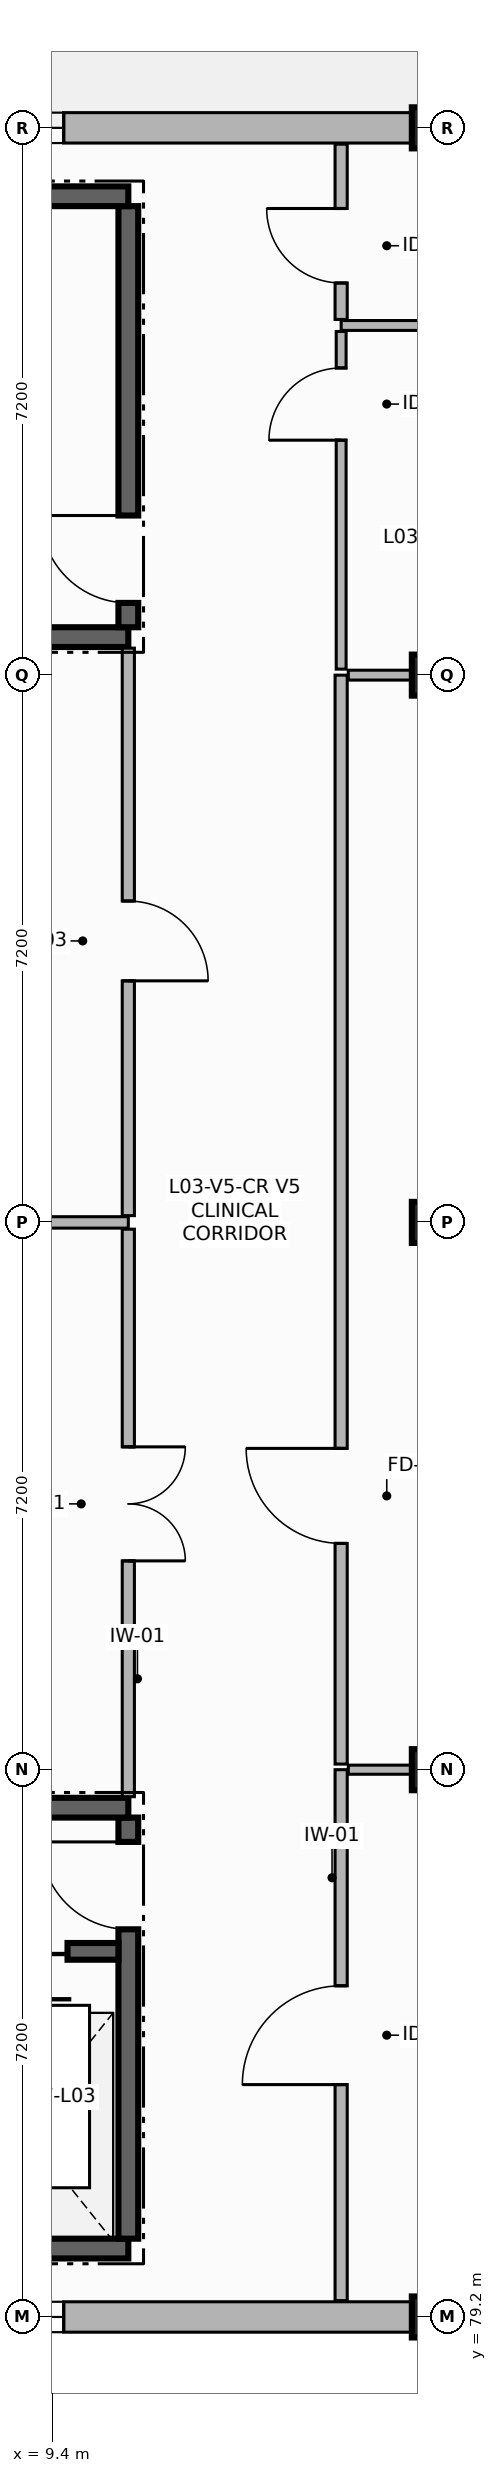
"""IFC4 building model, lengths in metres.
Left out: names, types, materials, properties, quantities, classifications, styles, units other than length and angle.
Written with IfcOpenShell. Run it as: python <this file> out.ifc"""

import sys

from ifc_helpers import new_model, si_unit, direction, frame, frame_2d, origin, origin_2d, place, context, subcontext, project, spatial, rectangle, extrude, element, fill, save


model = new_model("IFC4")
c1 = context("Model", 3, precision=1e-05, world=origin(), true_north=direction((0.0, 1.0)))
c2 = subcontext(c1, "Body", "Model", "MODEL_VIEW")
j1 = project(units=[si_unit("LENGTHUNIT", "METRE"), si_unit("PLANEANGLEUNIT", "RADIAN")], contexts=[c1])
p1 = place(None, origin())
s1 = spatial("IfcSite", under=j1, at=p1, CompositionType="ELEMENT")
p2 = place(p1, origin())
s2 = spatial("IfcBuilding", under=s1, at=p2, CompositionType="ELEMENT")
p3 = place(p2, frame((0.0, 0.0, 12.3)))
s3 = spatial("IfcBuildingStorey", under=s2, at=p3, CompositionType="ELEMENT", Elevation=12.3)
for number, where, z_axis, x_axis in (
    (1, (14.4, 79.2, 0.0), (0.0, 0.0, 1.0), (1.0, 0.0, 0.0)),
    (2, (14.4, 86.4, 0.0), (0.0, 0.0, 1.0), (1.0, 0.0, 0.0)),
    (3, (14.4, 93.6, 0.0), (0.0, 0.0, 1.0), (1.0, 0.0, 0.0)),
    (4, (14.4, 100.8, 0.0), (0.0, 0.0, 1.0), (1.0, 0.0, 0.0)),
    (5, (14.4, 108.0, 0.0), (0.0, 0.0, 1.0), (1.0, 0.0, 0.0)),
):
    element("IfcColumn", number, at=place(p3, frame(where, z_axis=z_axis, x_axis=x_axis)), inside=s3, PredefinedType="COLUMN", context=c2, shape_type="SweptSolid", body=[
        extrude(rectangle(XDim=0.54, YDim=0.54, at=origin_2d()), origin(), (0.0, 0.0, 1.0), 3.39),
    ])
p4 = place(p3, frame((7.2, 79.2, 0.0), z_axis=(0.0, 0.0, 1.0), x_axis=(1.0, 0.0, 0.0)))
e6 = element("IfcWall", 6, at=p4, inside=s3, PredefinedType="SOLIDWALL", context=c2, shape_type="SweptSolid", body=[
    extrude(rectangle(XDim=7.2, YDim=0.4, at=frame_2d((3.6, 0.0))), origin(), (0.0, 0.0, 1.0), 2.72),
])
p5 = place(p4, frame((0.85, 0.0, 0.9)))
e7 = element("IfcOpeningElement", 7, at=p5, cuts=e6, PredefinedType="OPENING", context=c2, shape_type="SweptSolid", body=[
    extrude(rectangle(XDim=1.5, YDim=1.6, at=frame_2d((0.75, 0.8))), frame((0.0, 0.21, 0.0), z_axis=(0.0, -1.0, 0.0), x_axis=(1.0, 0.0, 0.0)), (0.0, 0.0, 1.0), 0.42),
])
p6 = place(p3, frame((14.4, 108.0, 0.0), z_axis=(0.0, 0.0, 1.0), x_axis=(-1.0, 0.0, 0.0)))
e8 = element("IfcWall", 8, at=p6, inside=s3, PredefinedType="SOLIDWALL", context=c2, shape_type="SweptSolid", body=[
    extrude(rectangle(XDim=7.2, YDim=0.4, at=frame_2d((3.6, 0.0))), origin(), (0.0, 0.0, 1.0), 2.72),
])
p7 = place(p6, frame((4.85, 0.0, 0.9)))
e9 = element("IfcOpeningElement", 9, at=p7, cuts=e8, PredefinedType="OPENING", context=c2, shape_type="SweptSolid", body=[
    extrude(rectangle(XDim=1.5, YDim=1.6, at=frame_2d((0.75, 0.8))), frame((0.0, 0.21, 0.0), z_axis=(0.0, -1.0, 0.0), x_axis=(1.0, 0.0, 0.0)), (0.0, 0.0, 1.0), 0.42),
])
p8 = place(p3, frame((0.9, 80.1, 0.0), z_axis=(0.0, 0.0, 1.0), x_axis=(1.0, 0.0, 0.0)))
e10 = element("IfcWall", 10, at=p8, inside=s3, PredefinedType="SHEAR", context=c2, shape_type="SweptSolid", body=[
    extrude(rectangle(XDim=9.5, YDim=0.26, at=frame_2d((4.75, 0.0))), origin(), (0.0, 0.0, 1.0), 3.39),
])
p9 = place(p3, frame((10.4, 80.23, 0.0), z_axis=(0.0, 0.0, 1.0), x_axis=(0.0, 1.0, 0.0)))
e11 = element("IfcWall", 11, at=p9, inside=s3, PredefinedType="SHEAR", context=c2, shape_type="SweptSolid", body=[
    extrude(rectangle(XDim=5.54, YDim=0.26, at=frame_2d((2.77, 0.0))), origin(), (0.0, 0.0, 1.0), 3.39),
])
p10 = place(p9, frame((4.07, 0.0, 0.0)))
e12 = element("IfcOpeningElement", 12, at=p10, cuts=e11, PredefinedType="OPENING", context=c2, shape_type="SweptSolid", body=[
    extrude(rectangle(XDim=1.15, YDim=2.2, at=frame_2d((0.575, 1.1))), frame((0.0, 0.14, 0.0), z_axis=(0.0, -1.0, 0.0), x_axis=(1.0, 0.0, 0.0)), (0.0, 0.0, 1.0), 0.28),
])
p11 = place(p3, frame((10.4, 85.9, 0.0), z_axis=(0.0, 0.0, 1.0), x_axis=(-1.0, 0.0, 0.0)))
e13 = element("IfcWall", 13, at=p11, inside=s3, PredefinedType="SHEAR", context=c2, shape_type="SweptSolid", body=[
    extrude(rectangle(XDim=9.5, YDim=0.26, at=frame_2d((4.75, 0.0))), origin(), (0.0, 0.0, 1.0), 3.39),
])
p12 = place(p3, frame((1.03, 84.01, 0.0), z_axis=(0.0, 0.0, 1.0), x_axis=(1.0, 0.0, 0.0)))
e14 = element("IfcWall", 14, at=p12, inside=s3, PredefinedType="SHEAR", context=c2, shape_type="SweptSolid", body=[
    extrude(rectangle(XDim=9.24, YDim=0.22, at=frame_2d((4.62, 0.0))), origin(), (0.0, 0.0, 1.0), 3.39),
])
p13 = place(p12, frame((0.32, 0.0, 0.0)))
e15 = element("IfcOpeningElement", 15, at=p13, cuts=e14, PredefinedType="OPENING", context=c2, shape_type="SweptSolid", body=[
    extrude(rectangle(XDim=1.1, YDim=2.15, at=frame_2d((0.55, 1.075))), frame((0.0, 0.12, 0.0), z_axis=(0.0, -1.0, 0.0), x_axis=(1.0, 0.0, 0.0)), (0.0, 0.0, 1.0), 0.24),
])
p14 = place(p12, frame((7.37, 0.0, 0.0)))
e16 = element("IfcOpeningElement", 16, at=p14, cuts=e14, PredefinedType="OPENING", context=c2, shape_type="SweptSolid", body=[
    extrude(rectangle(XDim=1.2, YDim=2.2, at=frame_2d((0.6, 1.1))), frame((0.0, 0.12, 0.0), z_axis=(0.0, -1.0, 0.0), x_axis=(1.0, 0.0, 0.0)), (0.0, 0.0, 1.0), 0.24),
])
p15 = place(p3, frame((0.9, 101.3, 0.0), z_axis=(0.0, 0.0, 1.0), x_axis=(1.0, 0.0, 0.0)))
e17 = element("IfcWall", 17, at=p15, inside=s3, PredefinedType="SHEAR", context=c2, shape_type="SweptSolid", body=[
    extrude(rectangle(XDim=9.5, YDim=0.26, at=frame_2d((4.75, 0.0))), origin(), (0.0, 0.0, 1.0), 3.39),
])
p16 = place(p3, frame((10.4, 101.43, 0.0), z_axis=(0.0, 0.0, 1.0), x_axis=(0.0, 1.0, 0.0)))
e18 = element("IfcWall", 18, at=p16, inside=s3, PredefinedType="SHEAR", context=c2, shape_type="SweptSolid", body=[
    extrude(rectangle(XDim=5.54, YDim=0.26, at=frame_2d((2.77, 0.0))), origin(), (0.0, 0.0, 1.0), 3.39),
])
p17 = place(p16, frame((0.32, 0.0, 0.0)))
e19 = element("IfcOpeningElement", 19, at=p17, cuts=e18, PredefinedType="OPENING", context=c2, shape_type="SweptSolid", body=[
    extrude(rectangle(XDim=1.15, YDim=2.2, at=frame_2d((0.575, 1.1))), frame((0.0, 0.14, 0.0), z_axis=(0.0, -1.0, 0.0), x_axis=(1.0, 0.0, 0.0)), (0.0, 0.0, 1.0), 0.28),
])
p18 = place(p3, frame((10.4, 107.1, 0.0), z_axis=(0.0, 0.0, 1.0), x_axis=(-1.0, 0.0, 0.0)))
e20 = element("IfcWall", 20, at=p18, inside=s3, PredefinedType="SHEAR", context=c2, shape_type="SweptSolid", body=[
    extrude(rectangle(XDim=9.5, YDim=0.26, at=frame_2d((4.75, 0.0))), origin(), (0.0, 0.0, 1.0), 3.39),
])
p19 = place(p3, frame((0.215, 93.6, 0.0), z_axis=(0.0, 0.0, 1.0), x_axis=(1.0, 0.0, 0.0)))
e21 = element("IfcWall", 21, at=p19, inside=s3, PredefinedType="PARTITIONING", context=c2, shape_type="SweptSolid", body=[
    extrude(rectangle(XDim=10.185, YDim=0.15, at=frame_2d((5.092, 0.0))), origin(), (0.0, 0.0, 1.0), 2.7),
])
p20 = place(p3, frame((10.4, 93.511, 0.0), z_axis=(0.0, 0.0, 1.0), x_axis=(0.0, -1.0, 0.0)))
e22 = element("IfcWall", 22, at=p20, inside=s3, PredefinedType="PARTITIONING", context=c2, shape_type="SweptSolid", body=[
    extrude(rectangle(XDim=7.466, YDim=0.16, at=frame_2d((3.733, 0.0))), origin(), (0.0, 0.0, 1.0), 2.7),
])
p21 = place(p20, frame((2.864, 0.0, 0.0)))
e23 = element("IfcOpeningElement", 23, at=p21, cuts=e22, PredefinedType="OPENING", context=c2, shape_type="SweptSolid", body=[
    extrude(rectangle(XDim=1.5, YDim=2.3, at=frame_2d((0.75, 1.15))), frame((0.0, 0.09, 0.0), z_axis=(0.0, -1.0, 0.0), x_axis=(1.0, 0.0, 0.0)), (0.0, 0.0, 1.0), 0.18),
])
p22 = place(p3, frame((10.4, 101.155, 0.0), z_axis=(0.0, 0.0, 1.0), x_axis=(0.0, -1.0, 0.0)))
e24 = element("IfcWall", 24, at=p22, inside=s3, PredefinedType="PARTITIONING", context=c2, shape_type="SweptSolid", body=[
    extrude(rectangle(XDim=7.466, YDim=0.16, at=frame_2d((3.733, 0.0))), origin(), (0.0, 0.0, 1.0), 2.7),
])
p23 = place(p22, frame((3.327, 0.0, 0.0)))
e25 = element("IfcOpeningElement", 25, at=p23, cuts=e24, PredefinedType="OPENING", context=c2, shape_type="SweptSolid", body=[
    extrude(rectangle(XDim=1.05, YDim=2.15, at=frame_2d((0.525, 1.075))), frame((0.0, 0.09, 0.0), z_axis=(0.0, -1.0, 0.0), x_axis=(1.0, 0.0, 0.0)), (0.0, 0.0, 1.0), 0.18),
])
p24 = place(p3, frame((13.2, 79.415, 0.0), z_axis=(0.0, 0.0, 1.0), x_axis=(0.0, 1.0, 0.0)))
e26 = element("IfcWall", 26, at=p24, inside=s3, PredefinedType="PARTITIONING", context=c2, shape_type="SweptSolid", body=[
    extrude(rectangle(XDim=6.985, YDim=0.16, at=frame_2d((3.492, 0.0))), origin(), (0.0, 0.0, 1.0), 2.7),
])
p25 = place(p24, frame((2.842, 0.0, 0.0)))
e27 = element("IfcOpeningElement", 27, at=p25, cuts=e26, PredefinedType="OPENING", context=c2, shape_type="SweptSolid", body=[
    extrude(rectangle(XDim=1.3, YDim=2.25, at=frame_2d((0.65, 1.125))), frame((0.0, 0.09, 0.0), z_axis=(0.0, -1.0, 0.0), x_axis=(1.0, 0.0, 0.0)), (0.0, 0.0, 1.0), 0.18),
])
p26 = place(p3, frame((13.294, 86.4, 0.0), z_axis=(0.0, 0.0, 1.0), x_axis=(1.0, 0.0, 0.0)))
e28 = element("IfcWall", 28, at=p26, inside=s3, PredefinedType="PARTITIONING", context=c2, shape_type="SweptSolid", body=[
    extrude(rectangle(XDim=15.291, YDim=0.12, at=frame_2d((7.646, 0.0))), origin(), (0.0, 0.0, 1.0), 2.7),
])
p27 = place(p3, frame((13.2, 86.474, 0.0), z_axis=(0.0, 0.0, 1.0), x_axis=(0.0, 1.0, 0.0)))
e29 = element("IfcWall", 29, at=p27, inside=s3, PredefinedType="PARTITIONING", context=c2, shape_type="SweptSolid", body=[
    extrude(rectangle(XDim=14.326, YDim=0.16, at=frame_2d((7.163, 0.0))), origin(), (0.0, 0.0, 1.0), 2.7),
])
p28 = place(p27, frame((2.903, 0.0, 0.0)))
e30 = element("IfcOpeningElement", 30, at=p28, cuts=e29, PredefinedType="OPENING", context=c2, shape_type="SweptSolid", body=[
    extrude(rectangle(XDim=1.25, YDim=2.2, at=frame_2d((0.625, 1.1))), frame((0.0, 0.09, 0.0), z_axis=(0.0, -1.0, 0.0), x_axis=(1.0, 0.0, 0.0)), (0.0, 0.0, 1.0), 0.18),
])
p29 = place(p3, frame((13.294, 100.8, 0.0), z_axis=(0.0, 0.0, 1.0), x_axis=(1.0, 0.0, 0.0)))
e31 = element("IfcWall", 31, at=p29, inside=s3, PredefinedType="PARTITIONING", context=c2, shape_type="SweptSolid", body=[
    extrude(rectangle(XDim=3.506, YDim=0.13, at=frame_2d((1.753, 0.0))), origin(), (0.0, 0.0, 1.0), 2.7),
])
p30 = place(p3, frame((13.2, 105.4, 0.0), z_axis=(0.0, 0.0, 1.0), x_axis=(1.0, 0.0, 0.0)))
e32 = element("IfcWall", 32, at=p30, inside=s3, PredefinedType="PARTITIONING", context=c2, shape_type="SweptSolid", body=[
    extrude(rectangle(XDim=3.6, YDim=0.13, at=frame_2d((1.8, 0.0))), origin(), (0.0, 0.0, 1.0), 2.7),
])
p31 = place(p3, frame((13.2, 100.879, 0.0), z_axis=(0.0, 0.0, 1.0), x_axis=(0.0, 1.0, 0.0)))
e33 = element("IfcWall", 33, at=p31, inside=s3, PredefinedType="PARTITIONING", context=c2, shape_type="SweptSolid", body=[
    extrude(rectangle(XDim=4.442, YDim=0.13, at=frame_2d((2.221, 0.0))), origin(), (0.0, 0.0, 1.0), 2.7),
])
p32 = place(p31, frame((3.012, 0.0, 0.0)))
e34 = element("IfcOpeningElement", 34, at=p32, cuts=e33, PredefinedType="OPENING", context=c2, shape_type="SweptSolid", body=[
    extrude(rectangle(XDim=0.95, YDim=2.1, at=frame_2d((0.475, 1.05))), frame((0.0, 0.075, 0.0), z_axis=(0.0, -1.0, 0.0), x_axis=(1.0, 0.0, 0.0)), (0.0, 0.0, 1.0), 0.15),
])
p33 = place(p3, frame((13.2, 105.479, 0.0), z_axis=(0.0, 0.0, 1.0), x_axis=(0.0, 1.0, 0.0)))
e35 = element("IfcWall", 35, at=p33, inside=s3, PredefinedType="PARTITIONING", context=c2, shape_type="SweptSolid", body=[
    extrude(rectangle(XDim=2.306, YDim=0.16, at=frame_2d((1.153, 0.0))), origin(), (0.0, 0.0, 1.0), 2.7),
])
p34 = place(p33, frame((0.48, 0.0, 0.0)))
e36 = element("IfcOpeningElement", 36, at=p34, cuts=e35, PredefinedType="OPENING", context=c2, shape_type="SweptSolid", body=[
    extrude(rectangle(XDim=0.98, YDim=2.15, at=frame_2d((0.49, 1.075))), frame((0.0, 0.09, 0.0), z_axis=(0.0, -1.0, 0.0), x_axis=(1.0, 0.0, 0.0)), (0.0, 0.0, 1.0), 0.18),
])
p35 = place(p5, origin())
e37 = element("IfcWindow", 37, at=p35, inside=s3, PartitioningType="SINGLE_PANEL", PredefinedType="WINDOW", context=c2, shape_type="SweptSolid", body=[
    extrude(rectangle(XDim=1.5, YDim=1.6, at=frame_2d((0.75, 0.8))), frame((0.0, 0.03, 0.0), z_axis=(0.0, -1.0, 0.0), x_axis=(1.0, 0.0, 0.0)), (0.0, 0.0, 1.0), 0.06),
])
fill(e7, e37)
p36 = place(p7, origin())
e38 = element("IfcWindow", 38, at=p36, inside=s3, PartitioningType="SINGLE_PANEL", PredefinedType="WINDOW", context=c2, shape_type="SweptSolid", body=[
    extrude(rectangle(XDim=1.5, YDim=1.6, at=frame_2d((0.75, 0.8))), frame((0.0, 0.03, 0.0), z_axis=(0.0, -1.0, 0.0), x_axis=(1.0, 0.0, 0.0)), (0.0, 0.0, 1.0), 0.06),
])
fill(e9, e38)
p37 = place(p14, origin())
e39 = element("IfcDoor", 39, at=p37, inside=s3, OperationType="DOUBLE_DOOR_SLIDING", PredefinedType="DOOR", context=c2, shape_type="SweptSolid", body=[
    extrude(rectangle(XDim=1.2, YDim=2.2, at=frame_2d((0.6, 1.1))), frame((0.0, 0.025, 0.0), z_axis=(0.0, -1.0, 0.0), x_axis=(1.0, 0.0, 0.0)), (0.0, 0.0, 1.0), 0.05),
])
fill(e16, e39)
p38 = place(p10, origin())
e40 = element("IfcDoor", 40, at=p38, inside=s3, OperationType="SINGLE_SWING_RIGHT", PredefinedType="DOOR", context=c2, shape_type="SweptSolid", body=[
    extrude(rectangle(XDim=1.15, YDim=2.2, at=frame_2d((0.575, 1.1))), frame((0.0, 0.025, 0.0), z_axis=(0.0, -1.0, 0.0), x_axis=(1.0, 0.0, 0.0)), (0.0, 0.0, 1.0), 0.05),
])
fill(e12, e40)
p39 = place(p17, origin())
e41 = element("IfcDoor", 41, at=p39, inside=s3, OperationType="SINGLE_SWING_RIGHT", PredefinedType="DOOR", context=c2, shape_type="SweptSolid", body=[
    extrude(rectangle(XDim=1.15, YDim=2.2, at=frame_2d((0.575, 1.1))), frame((0.0, 0.025, 0.0), z_axis=(0.0, -1.0, 0.0), x_axis=(1.0, 0.0, 0.0)), (0.0, 0.0, 1.0), 0.05),
])
fill(e19, e41)
p40 = place(p21, origin())
e42 = element("IfcDoor", 42, at=p40, inside=s3, OperationType="DOUBLE_DOOR_SINGLE_SWING", PredefinedType="DOOR", context=c2, shape_type="SweptSolid", body=[
    extrude(rectangle(XDim=1.5, YDim=2.3, at=frame_2d((0.75, 1.15))), frame((0.0, 0.025, 0.0), z_axis=(0.0, -1.0, 0.0), x_axis=(1.0, 0.0, 0.0)), (0.0, 0.0, 1.0), 0.05),
])
fill(e23, e42)
p41 = place(p23, origin())
e43 = element("IfcDoor", 43, at=p41, inside=s3, OperationType="SINGLE_SWING_RIGHT", PredefinedType="DOOR", context=c2, shape_type="SweptSolid", body=[
    extrude(rectangle(XDim=1.05, YDim=2.15, at=frame_2d((0.525, 1.075))), frame((0.0, 0.025, 0.0), z_axis=(0.0, -1.0, 0.0), x_axis=(1.0, 0.0, 0.0)), (0.0, 0.0, 1.0), 0.05),
])
fill(e25, e43)
p42 = place(p25, origin())
e44 = element("IfcDoor", 44, at=p42, inside=s3, OperationType="SINGLE_SWING_LEFT", PredefinedType="DOOR", context=c2, shape_type="SweptSolid", body=[
    extrude(rectangle(XDim=1.3, YDim=2.25, at=frame_2d((0.65, 1.125))), frame((0.0, 0.025, 0.0), z_axis=(0.0, -1.0, 0.0), x_axis=(1.0, 0.0, 0.0)), (0.0, 0.0, 1.0), 0.05),
])
fill(e27, e44)
p43 = place(p28, origin())
e45 = element("IfcDoor", 45, at=p43, inside=s3, OperationType="SINGLE_SWING_RIGHT", PredefinedType="DOOR", context=c2, shape_type="SweptSolid", body=[
    extrude(rectangle(XDim=1.25, YDim=2.2, at=frame_2d((0.625, 1.1))), frame((0.0, 0.025, 0.0), z_axis=(0.0, -1.0, 0.0), x_axis=(1.0, 0.0, 0.0)), (0.0, 0.0, 1.0), 0.05),
])
fill(e30, e45)
p44 = place(p32, origin())
e46 = element("IfcDoor", 46, at=p44, inside=s3, OperationType="SINGLE_SWING_LEFT", PredefinedType="DOOR", context=c2, shape_type="SweptSolid", body=[
    extrude(rectangle(XDim=0.95, YDim=2.1, at=frame_2d((0.475, 1.05))), frame((0.0, 0.025, 0.0), z_axis=(0.0, -1.0, 0.0), x_axis=(1.0, 0.0, 0.0)), (0.0, 0.0, 1.0), 0.05),
])
fill(e34, e46)
p45 = place(p34, origin())
e47 = element("IfcDoor", 47, at=p45, inside=s3, OperationType="SINGLE_SWING_RIGHT", PredefinedType="DOOR", context=c2, shape_type="SweptSolid", body=[
    extrude(rectangle(XDim=0.98, YDim=2.15, at=frame_2d((0.49, 1.075))), frame((0.0, 0.025, 0.0), z_axis=(0.0, -1.0, 0.0), x_axis=(1.0, 0.0, 0.0)), (0.0, 0.0, 1.0), 0.05),
])
fill(e36, e47)
save(model, sys.argv[1])
